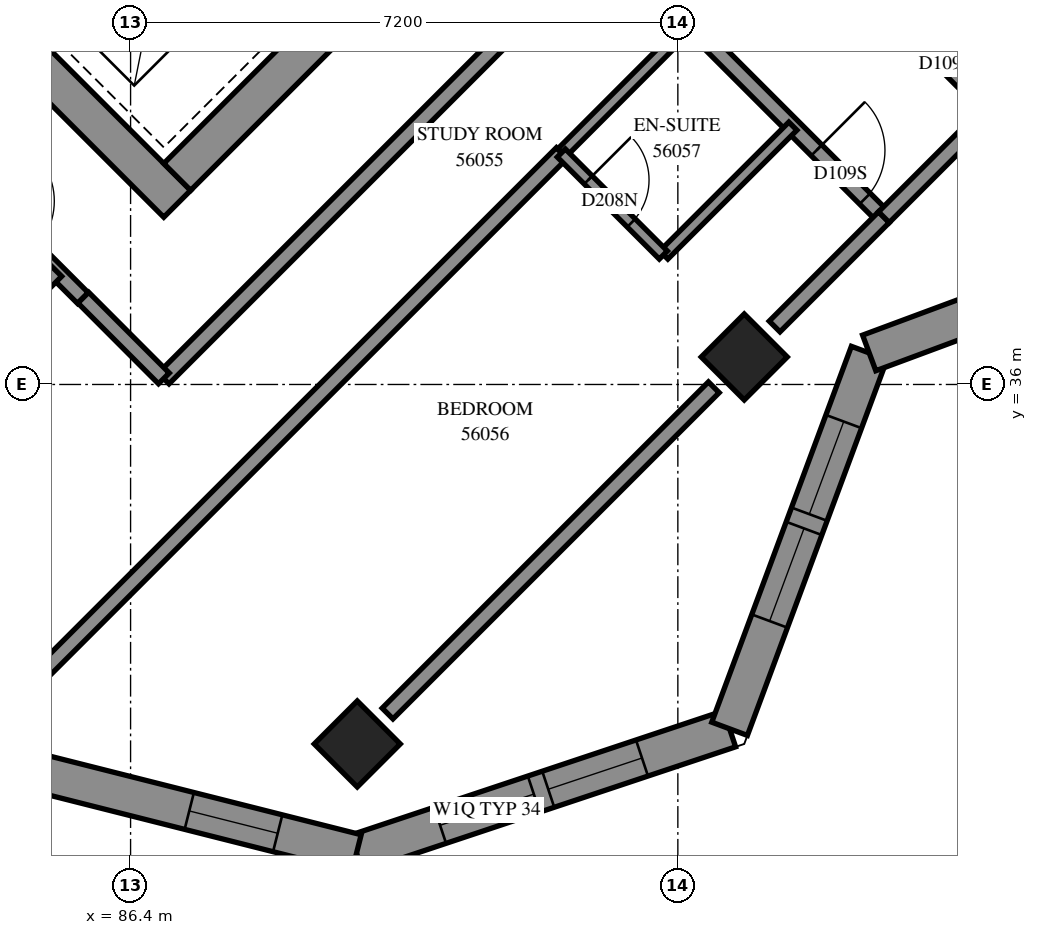
"""IFC4 building model, lengths in metres.
Left out: names, types, materials, properties, quantities, classifications, styles, units other than length and angle.
Written with IfcOpenShell. Run it as: python <this file> out.ifc"""

import sys

from ifc_helpers import new_model, si_unit, direction, frame, frame_2d, origin, origin_2d, place, context, subcontext, project, spatial, polyline, rectangle, outline, extrude, element, fill, save


model = new_model("IFC4")
c1 = context("Model", 3, precision=1e-05, world=origin(), true_north=direction((0.0, 1.0)))
c2 = subcontext(c1, "Body", "Model", "MODEL_VIEW")
j1 = project(units=[si_unit("LENGTHUNIT", "METRE"), si_unit("PLANEANGLEUNIT", "RADIAN")], contexts=[c1])
p1 = place(None, origin())
s1 = spatial("IfcSite", under=j1, at=p1, CompositionType="ELEMENT")
p2 = place(p1, origin())
s2 = spatial("IfcBuilding", under=s1, at=p2, CompositionType="ELEMENT")
p3 = place(p2, frame((0.0, 0.0, 206.6)))
s3 = spatial("IfcBuildingStorey", under=s2, at=p3, CompositionType="ELEMENT", Elevation=206.6)
for number, where, z_axis, x_axis in (
    (1, (94.474, 36.362, 0.0), (0.0, 0.0, 1.0), (0.707, -0.707, 0.0)),
    (2, (89.382, 31.271, 0.0), (0.0, 0.0, 1.0), (0.707, -0.707, 0.0)),
):
    element("IfcColumn", number, at=place(p3, frame(where, z_axis=z_axis, x_axis=x_axis)), inside=s3, PredefinedType="COLUMN", context=c2, shape_type="SweptSolid", body=[
        extrude(rectangle(XDim=0.8, YDim=0.8, at=origin_2d()), origin(), (0.0, 0.0, 1.0), 3.1),
    ])
p4 = place(p3, frame((76.124, 49.267, -0.3), z_axis=(0.0, 0.0, 1.0), x_axis=(0.7071067812, -0.7071067812, 0.0)))
e3 = element("IfcWall", 3, at=p4, inside=s3, PredefinedType="SHEAR", context=c2, shape_type="SweptSolid", body=[
    extrude(rectangle(XDim=15.4, YDim=0.5, at=frame_2d((7.7, 0.0))), origin(), (0.0, 0.0, 1.0), 2.7),
])
p5 = place(p3, frame((87.013, 38.731, -0.3), z_axis=(0.0, 0.0, 1.0), x_axis=(0.7071067812, 0.7071067812, 0.0)))
e4 = element("IfcWall", 4, at=p5, inside=s3, PredefinedType="SHEAR", context=c2, shape_type="SweptSolid", body=[
    extrude(rectangle(XDim=14.4, YDim=0.5, at=frame_2d((7.2, 0.0))), origin(), (0.0, 0.0, 1.0), 2.7),
])
p6 = place(p5, frame((4.55, 0.0, 0.3)))
e5 = element("IfcOpeningElement", 5, at=p6, cuts=e4, PredefinedType="OPENING", context=c2, shape_type="SweptSolid", body=[
    extrude(rectangle(XDim=1.1, YDim=2.1, at=frame_2d((0.55, 1.05))), frame((0.0, 0.26, 0.0), z_axis=(0.0, -1.0, 0.0), x_axis=(1.0, 0.0, 0.0)), (0.0, 0.0, 1.0), 0.52),
])
p7 = place(p5, frame((11.35, 0.0, 0.3)))
e6 = element("IfcOpeningElement", 6, at=p7, cuts=e4, PredefinedType="OPENING", context=c2, shape_type="SweptSolid", body=[
    extrude(rectangle(XDim=1.1, YDim=2.1, at=frame_2d((0.55, 1.05))), frame((0.0, 0.26, 0.0), z_axis=(0.0, -1.0, 0.0), x_axis=(1.0, 0.0, 0.0)), (0.0, 0.0, 1.0), 0.52),
])
p8 = place(p3, frame((89.373, 29.834, 0.0), z_axis=(0.0, 0.0, 1.0), x_axis=(0.9486871637, 0.3162161688, 0.0)))
e7 = element("IfcWall", 7, at=p8, inside=s3, PredefinedType="SOLIDWALL", context=c2, shape_type="SweptSolid", body=[
    extrude(outline(polyline([(-0.073, -0.25), (5.293, -0.25), (5.054, 0.25), (0.073, 0.25), (-0.073, -0.25)])), origin(), (0.0, 0.0, 1.0), 3.1),
])
p9 = place(p8, frame((1.159, 0.0, 0.45)))
e8 = element("IfcOpeningElement", 8, at=p9, cuts=e7, PredefinedType="OPENING", context=c2, shape_type="SweptSolid", body=[
    extrude(rectangle(XDim=1.3, YDim=2.5, at=frame_2d((0.65, 1.25))), frame((0.0, 0.26, 0.0), z_axis=(0.0, -1.0, 0.0), x_axis=(1.0, 0.0, 0.0)), (0.0, 0.0, 1.0), 0.52),
])
p10 = place(p8, frame((2.659, 0.0, 0.45)))
e9 = element("IfcOpeningElement", 9, at=p10, cuts=e7, PredefinedType="OPENING", context=c2, shape_type="SweptSolid", body=[
    extrude(rectangle(XDim=1.3, YDim=2.5, at=frame_2d((0.65, 1.25))), frame((0.0, 0.26, 0.0), z_axis=(0.0, -1.0, 0.0), x_axis=(1.0, 0.0, 0.0)), (0.0, 0.0, 1.0), 0.52),
])
p11 = place(p3, frame((94.281, 31.47, 0.0), z_axis=(0.0, 0.0, 1.0), x_axis=(0.3481903374, 0.9374238577, 0.0)))
e10 = element("IfcWall", 10, at=p11, inside=s3, PredefinedType="SOLIDWALL", context=c2, shape_type="SweptSolid", body=[
    extrude(outline(polyline([(-0.12, -0.25), (5.16, -0.25), (5.39, 0.25), (0.12, 0.25), (-0.12, -0.25)])), origin(), (0.0, 0.0, 1.0), 3.1),
])
p12 = place(p11, frame((1.512, 0.0, 0.45)))
e11 = element("IfcOpeningElement", 11, at=p12, cuts=e10, PredefinedType="OPENING", context=c2, shape_type="SweptSolid", body=[
    extrude(rectangle(XDim=1.3, YDim=2.5, at=frame_2d((0.65, 1.25))), frame((0.0, 0.26, 0.0), z_axis=(0.0, -1.0, 0.0), x_axis=(1.0, 0.0, 0.0)), (0.0, 0.0, 1.0), 0.52),
])
p13 = place(p11, frame((3.012, 0.0, 0.45)))
e12 = element("IfcOpeningElement", 12, at=p13, cuts=e10, PredefinedType="OPENING", context=c2, shape_type="SweptSolid", body=[
    extrude(rectangle(XDim=1.3, YDim=2.5, at=frame_2d((0.65, 1.25))), frame((0.0, 0.26, 0.0), z_axis=(0.0, -1.0, 0.0), x_axis=(1.0, 0.0, 0.0)), (0.0, 0.0, 1.0), 0.52),
])
p14 = place(p3, frame((96.118, 36.415, 0.0), z_axis=(0.0, 0.0, 1.0), x_axis=(0.9374238577, 0.3481903374, 0.0)))
e13 = element("IfcWall", 13, at=p14, inside=s3, PredefinedType="SOLIDWALL", context=c2, shape_type="SweptSolid", body=[
    extrude(outline(polyline([(0.115, -0.25), (5.395, -0.25), (5.155, 0.25), (-0.115, 0.25), (0.115, -0.25)])), origin(), (0.0, 0.0, 1.0), 3.1),
])
p15 = place(p14, frame((1.655, 0.0, 0.45)))
e14 = element("IfcOpeningElement", 14, at=p15, cuts=e13, PredefinedType="OPENING", context=c2, shape_type="SweptSolid", body=[
    extrude(rectangle(XDim=1.3, YDim=2.5, at=frame_2d((0.65, 1.25))), frame((0.0, 0.26, 0.0), z_axis=(0.0, -1.0, 0.0), x_axis=(1.0, 0.0, 0.0)), (0.0, 0.0, 1.0), 0.52),
])
p16 = place(p14, frame((3.155, 0.0, 0.45)))
e15 = element("IfcOpeningElement", 15, at=p16, cuts=e13, PredefinedType="OPENING", context=c2, shape_type="SweptSolid", body=[
    extrude(rectangle(XDim=1.3, YDim=2.5, at=frame_2d((0.65, 1.25))), frame((0.0, 0.26, 0.0), z_axis=(0.0, -1.0, 0.0), x_axis=(1.0, 0.0, 0.0)), (0.0, 0.0, 1.0), 0.52),
])
p17 = place(p3, frame((85.041, 30.928, 0.0), z_axis=(0.0, 0.0, 1.0), x_axis=(0.9695577127, -0.2448629039, 0.0)))
e16 = element("IfcWall", 16, at=p17, inside=s3, PredefinedType="SOLIDWALL", context=c2, shape_type="SweptSolid", body=[
    extrude(outline(polyline([(-0.143, -0.25), (4.541, -0.25), (4.394, 0.25), (0.143, 0.25), (-0.143, -0.25)])), origin(), (0.0, 0.0, 1.0), 3.1),
])
p18 = place(p17, frame((2.198, 0.0, 0.45)))
e17 = element("IfcOpeningElement", 17, at=p18, cuts=e16, PredefinedType="OPENING", context=c2, shape_type="SweptSolid", body=[
    extrude(rectangle(XDim=1.2, YDim=2.5, at=frame_2d((0.6, 1.25))), frame((0.0, 0.26, 0.0), z_axis=(0.0, -1.0, 0.0), x_axis=(1.0, 0.0, 0.0)), (0.0, 0.0, 1.0), 0.52),
])
p19 = place(p3, frame((84.996, 31.971, 0.0), z_axis=(0.0, 0.0, 1.0), x_axis=(0.7072316927, 0.7069818476, 0.0)))
e18 = element("IfcWall", 18, at=p19, inside=s3, PredefinedType="PARTITIONING", context=c2, shape_type="SweptSolid", body=[
    extrude(rectangle(XDim=10.006, YDim=0.2, at=frame_2d((5.003, 0.0))), origin(), (0.0, 0.0, 1.0), 3.1),
])
p20 = place(p3, frame((86.835, 36.079, 0.0), z_axis=(0.0, 0.0, 1.0), x_axis=(0.7071067812, 0.7071067812, 0.0)))
e19 = element("IfcWall", 19, at=p20, inside=s3, PredefinedType="PARTITIONING", context=c2, shape_type="SweptSolid", body=[
    extrude(rectangle(XDim=8.2, YDim=0.2, at=frame_2d((4.1, 0.0))), origin(), (0.0, 0.0, 1.0), 3.1),
])
p21 = place(p3, frame((80.849, 42.061, 0.0), z_axis=(0.0, 0.0, 1.0), x_axis=(0.7071067812, -0.7071067812, 0.0)))
e20 = element("IfcWall", 20, at=p21, inside=s3, PredefinedType="PARTITIONING", context=c2, shape_type="SweptSolid", body=[
    extrude(rectangle(XDim=6.964, YDim=0.2, at=frame_2d((3.482, 0.0))), origin(), (0.0, 0.0, 1.0), 3.1),
])
p22 = place(p21, frame((5.159, 0.0, 0.0)))
e21 = element("IfcOpeningElement", 21, at=p22, cuts=e20, PredefinedType="OPENING", context=c2, shape_type="SweptSolid", body=[
    extrude(rectangle(XDim=0.9, YDim=2.1, at=frame_2d((0.45, 1.05))), frame((0.0, 0.11, 0.0), z_axis=(0.0, -1.0, 0.0), x_axis=(1.0, 0.0, 0.0)), (0.0, 0.0, 1.0), 0.22),
])
p23 = place(p3, frame((89.781, 31.671, 0.0), z_axis=(0.0, 0.0, 1.0), x_axis=(0.7071067812, 0.7071067812, 0.0)))
e22 = element("IfcWall", 22, at=p23, inside=s3, PredefinedType="PARTITIONING", context=c2, shape_type="SweptSolid", body=[
    extrude(rectangle(XDim=6.07, YDim=0.2, at=frame_2d((3.035, 0.0))), origin(), (0.0, 0.0, 1.0), 2.6),
])
p24 = place(p3, frame((94.047, 43.287, 0.0), z_axis=(0.0, 0.0, 1.0), x_axis=(0.7071067812, -0.7071067812, 0.0)))
e23 = element("IfcWall", 23, at=p24, inside=s3, PredefinedType="PARTITIONING", context=c2, shape_type="SweptSolid", body=[
    extrude(rectangle(XDim=5.199, YDim=0.2, at=frame_2d((2.599, 0.0))), origin(), (0.0, 0.0, 1.0), 3.1),
])
p25 = place(p24, frame((3.898, 0.0, 0.0)))
e24 = element("IfcOpeningElement", 24, at=p25, cuts=e23, PredefinedType="OPENING", context=c2, shape_type="SweptSolid", body=[
    extrude(rectangle(XDim=0.9, YDim=2.1, at=frame_2d((0.45, 1.05))), frame((0.0, 0.11, 0.0), z_axis=(0.0, -1.0, 0.0), x_axis=(1.0, 0.0, 0.0)), (0.0, 0.0, 1.0), 0.22),
])
p26 = place(p3, frame((92.633, 41.873, 0.0), z_axis=(0.0, 0.0, 1.0), x_axis=(0.7071067812, -0.7071067812, 0.0)))
e25 = element("IfcWall", 25, at=p26, inside=s3, PredefinedType="PARTITIONING", context=c2, shape_type="SweptSolid", body=[
    extrude(rectangle(XDim=5.199, YDim=0.2, at=frame_2d((2.599, 0.0))), origin(), (0.0, 0.0, 1.0), 3.1),
])
p27 = place(p26, frame((0.253, 0.0, 0.0)))
e26 = element("IfcOpeningElement", 26, at=p27, cuts=e25, PredefinedType="OPENING", context=c2, shape_type="SweptSolid", body=[
    extrude(rectangle(XDim=1.0, YDim=2.1, at=frame_2d((0.5, 1.05))), frame((0.0, 0.11, 0.0), z_axis=(0.0, -1.0, 0.0), x_axis=(1.0, 0.0, 0.0)), (0.0, 0.0, 1.0), 0.22),
])
p28 = place(p26, frame((3.948, 0.0, 0.0)))
e27 = element("IfcOpeningElement", 27, at=p28, cuts=e25, PredefinedType="OPENING", context=c2, shape_type="SweptSolid", body=[
    extrude(rectangle(XDim=0.9, YDim=2.1, at=frame_2d((0.45, 1.05))), frame((0.0, 0.11, 0.0), z_axis=(0.0, -1.0, 0.0), x_axis=(1.0, 0.0, 0.0)), (0.0, 0.0, 1.0), 0.22),
])
for number, where, z_axis, x_axis in (
    (28, (92.072, 39.046, 0.0), (0.0, 0.0, 1.0), (0.707, 0.708, 0.0)),
    (29, (93.415, 37.703, 0.0), (0.0, 0.0, 1.0), (0.708, 0.707, 0.0)),
):
    element("IfcWall", number, at=place(p3, frame(where, z_axis=z_axis, x_axis=x_axis)), inside=s3, PredefinedType="PARTITIONING", context=c2, shape_type="SweptSolid", body=[
        extrude(rectangle(XDim=2.4, YDim=0.15, at=frame_2d((1.2, 0.0))), origin(), (0.0, 0.0, 1.0), 3.1),
    ])
p29 = place(p3, frame((94.873, 36.763, 0.0), z_axis=(0.0, 0.0, 1.0), x_axis=(0.7071067812, 0.7071067812, 0.0)))
e30 = element("IfcWall", 30, at=p29, inside=s3, PredefinedType="PARTITIONING", context=c2, shape_type="SweptSolid", body=[
    extrude(rectangle(XDim=2.034, YDim=0.2, at=frame_2d((1.017, 0.0))), origin(), (0.0, 0.0, 1.0), 2.6),
])
p30 = place(p3, frame((96.311, 38.201, 0.0), z_axis=(0.0, 0.0, 1.0), x_axis=(0.7071067812, 0.7071067812, 0.0)))
e31 = element("IfcWall", 31, at=p30, inside=s3, PredefinedType="PARTITIONING", context=c2, shape_type="SweptSolid", body=[
    extrude(rectangle(XDim=2.0, YDim=0.2, at=frame_2d((1.0, 0.0))), origin(), (0.0, 0.0, 1.0), 2.6),
])
p31 = place(p3, frame((92.067, 39.045, 0.0), z_axis=(0.0, 0.0, 1.0), x_axis=(0.7071067812, -0.7071067812, 0.0)))
e32 = element("IfcWall", 32, at=p31, inside=s3, PredefinedType="PARTITIONING", context=c2, shape_type="SweptSolid", body=[
    extrude(rectangle(XDim=1.898, YDim=0.15, at=frame_2d((0.949, 0.0))), origin(), (0.0, 0.0, 1.0), 3.1),
])
p32 = place(p31, frame((0.501, 0.0, 0.0)))
e33 = element("IfcOpeningElement", 33, at=p32, cuts=e32, PredefinedType="OPENING", context=c2, shape_type="SweptSolid", body=[
    extrude(rectangle(XDim=0.8, YDim=2.1, at=frame_2d((0.4, 1.05))), frame((0.0, 0.085, 0.0), z_axis=(0.0, -1.0, 0.0), x_axis=(1.0, 0.0, 0.0)), (0.0, 0.0, 1.0), 0.17),
])
p33 = place(p3, frame((85.778, 37.142, 0.0), z_axis=(0.0, 0.0, 1.0), x_axis=(0.7064400143, -0.70777292, 0.0)))
e34 = element("IfcWall", 34, at=p33, inside=s3, PredefinedType="PARTITIONING", context=c2, shape_type="SweptSolid", body=[
    extrude(rectangle(XDim=1.5, YDim=0.2, at=frame_2d((0.75, 0.0))), origin(), (0.0, 0.0, 1.0), 3.1),
])
p34 = place(p3, frame((84.693, 36.761, 0.0), z_axis=(0.0, 0.0, 1.0), x_axis=(0.7061388061, 0.708073433, 0.0)))
e35 = element("IfcWall", 35, at=p34, inside=s3, PredefinedType="PARTITIONING", context=c2, shape_type="SweptSolid", body=[
    extrude(rectangle(XDim=1.034, YDim=0.2, at=frame_2d((0.517, 0.0))), origin(), (0.0, 0.0, 1.0), 3.1),
])
p35 = place(p9, origin())
e36 = element("IfcWindow", 36, at=p35, inside=s3, PartitioningType="SINGLE_PANEL", PredefinedType="WINDOW", context=c2, shape_type="SweptSolid", body=[
    extrude(rectangle(XDim=1.3, YDim=2.5, at=frame_2d((0.65, 1.25))), frame((0.0, 0.18, 0.0), z_axis=(0.0, -1.0, 0.0), x_axis=(1.0, 0.0, 0.0)), (0.0, 0.0, 1.0), 0.06),
])
fill(e8, e36)
p36 = place(p10, origin())
e37 = element("IfcWindow", 37, at=p36, inside=s3, PartitioningType="SINGLE_PANEL", PredefinedType="WINDOW", context=c2, shape_type="SweptSolid", body=[
    extrude(rectangle(XDim=1.3, YDim=2.5, at=frame_2d((0.65, 1.25))), frame((0.0, 0.18, 0.0), z_axis=(0.0, -1.0, 0.0), x_axis=(1.0, 0.0, 0.0)), (0.0, 0.0, 1.0), 0.06),
])
fill(e9, e37)
p37 = place(p12, origin())
e38 = element("IfcWindow", 38, at=p37, inside=s3, PartitioningType="SINGLE_PANEL", PredefinedType="WINDOW", context=c2, shape_type="SweptSolid", body=[
    extrude(rectangle(XDim=1.3, YDim=2.5, at=frame_2d((0.65, 1.25))), frame((0.0, 0.18, 0.0), z_axis=(0.0, -1.0, 0.0), x_axis=(1.0, 0.0, 0.0)), (0.0, 0.0, 1.0), 0.06),
])
fill(e11, e38)
p38 = place(p13, origin())
e39 = element("IfcWindow", 39, at=p38, inside=s3, PartitioningType="SINGLE_PANEL", PredefinedType="WINDOW", context=c2, shape_type="SweptSolid", body=[
    extrude(rectangle(XDim=1.3, YDim=2.5, at=frame_2d((0.65, 1.25))), frame((0.0, 0.18, 0.0), z_axis=(0.0, -1.0, 0.0), x_axis=(1.0, 0.0, 0.0)), (0.0, 0.0, 1.0), 0.06),
])
fill(e12, e39)
p39 = place(p18, origin())
e40 = element("IfcWindow", 40, at=p39, inside=s3, PartitioningType="SINGLE_PANEL", PredefinedType="WINDOW", context=c2, shape_type="SweptSolid", body=[
    extrude(rectangle(XDim=1.2, YDim=2.5, at=frame_2d((0.6, 1.25))), frame((0.0, 0.18, 0.0), z_axis=(0.0, -1.0, 0.0), x_axis=(1.0, 0.0, 0.0)), (0.0, 0.0, 1.0), 0.06),
])
fill(e17, e40)
p40 = place(p28, origin())
e41 = element("IfcDoor", 41, at=p40, inside=s3, OperationType="SINGLE_SWING_LEFT", PredefinedType="DOOR", context=c2, shape_type="SweptSolid", body=[
    extrude(rectangle(XDim=0.9, YDim=2.1, at=frame_2d((0.45, 1.05))), frame((0.0, 0.025, 0.0), z_axis=(0.0, -1.0, 0.0), x_axis=(1.0, 0.0, 0.0)), (0.0, 0.0, 1.0), 0.05),
])
fill(e27, e41)
p41 = place(p32, origin())
e42 = element("IfcDoor", 42, at=p41, inside=s3, OperationType="SINGLE_SWING_RIGHT", PredefinedType="DOOR", context=c2, shape_type="SweptSolid", body=[
    extrude(rectangle(XDim=0.8, YDim=2.1, at=frame_2d((0.4, 1.05))), frame((0.0, 0.025, 0.0), z_axis=(0.0, -1.0, 0.0), x_axis=(1.0, 0.0, 0.0)), (0.0, 0.0, 1.0), 0.05),
])
fill(e33, e42)
p42 = place(p25, origin())
e43 = element("IfcDoor", 43, at=p42, inside=s3, OperationType="SINGLE_SWING_RIGHT", PredefinedType="DOOR", context=c2, shape_type="SweptSolid", body=[
    extrude(rectangle(XDim=0.9, YDim=2.1, at=frame_2d((0.45, 1.05))), frame((0.0, 0.025, 0.0), z_axis=(0.0, -1.0, 0.0), x_axis=(1.0, 0.0, 0.0)), (0.0, 0.0, 1.0), 0.05),
])
fill(e24, e43)
save(model, sys.argv[1])
